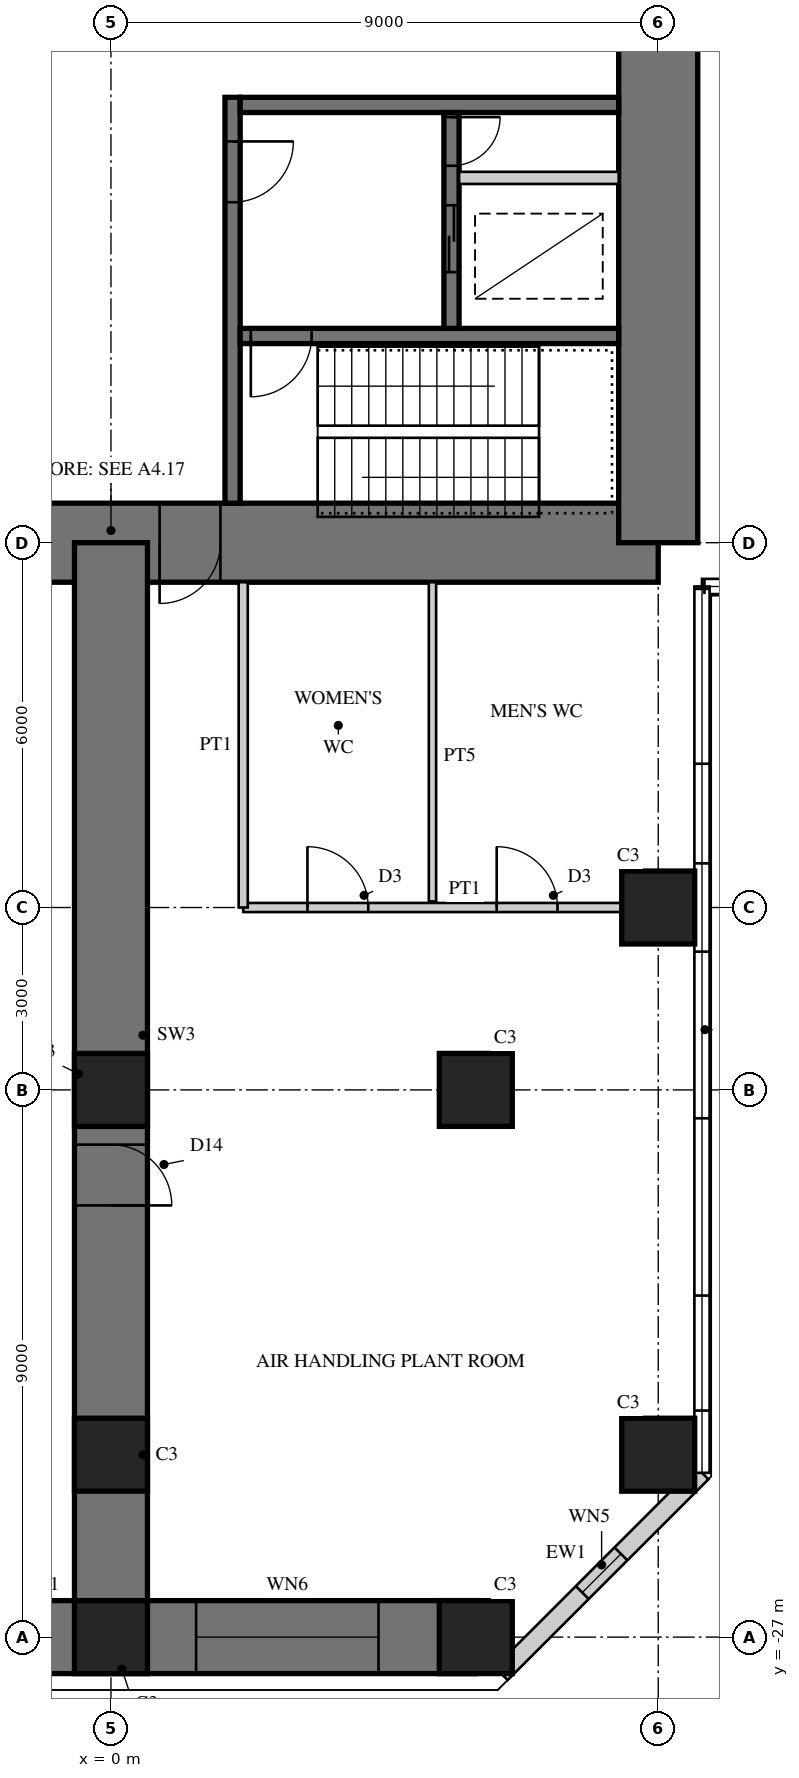
"""IFC4 building model, lengths in metres.
Left out: names, types, materials, properties, quantities, classifications, styles, units other than length and angle.
Written with IfcOpenShell. Run it as: python <this file> out.ifc"""

import sys

from ifc_helpers import new_model, si_unit, direction, frame, frame_2d, origin, origin_2d, place, context, subcontext, project, spatial, rectangle, hollow_rectangle, extrude, element, fill, save


model = new_model("IFC4")
c1 = context("Model", 3, precision=1e-05, world=origin(), true_north=direction((0.0, 1.0)))
c2 = subcontext(c1, "Body", "Model", "MODEL_VIEW")
j1 = project(units=[si_unit("LENGTHUNIT", "METRE"), si_unit("PLANEANGLEUNIT", "RADIAN")], contexts=[c1])
p1 = place(None, origin())
s1 = spatial("IfcSite", under=j1, at=p1, CompositionType="ELEMENT")
p2 = place(p1, origin())
s2 = spatial("IfcBuilding", under=s1, at=p2, CompositionType="ELEMENT")
p3 = place(p2, frame((0.0, 0.0, 95.5)))
s3 = spatial("IfcBuildingStorey", under=s2, at=p3, CompositionType="ELEMENT", Elevation=95.5)
p4 = place(p3, frame((-9.0, -9.0, 0.0), z_axis=(0.0, 0.0, 1.0), x_axis=(1.0, 0.0, 0.0)))
e1 = element("IfcWall", 1, at=p4, inside=s3, PredefinedType="SHEAR", context=c2, shape_type="SweptSolid", body=[
    extrude(rectangle(XDim=18.0, YDim=1.3, at=frame_2d((9.0, 0.0))), origin(), (0.0, 0.0, 1.0), 5.0),
])
p5 = place(p4, frame((9.8, 0.0, 0.0)))
e2 = element("IfcOpeningElement", 2, at=p5, cuts=e1, PredefinedType="OPENING", context=c2, shape_type="SweptSolid", body=[
    extrude(rectangle(XDim=1.0, YDim=2.4, at=frame_2d((0.5, 1.2))), frame((0.0, 0.66, 0.0), z_axis=(0.0, -1.0, 0.0), x_axis=(1.0, 0.0, 0.0)), (0.0, 0.0, 1.0), 1.32),
])
p6 = place(p3, frame((9.0, -9.0, 0.0), z_axis=(0.0, 0.0, 1.0), x_axis=(0.0, 1.0, 0.0)))
e3 = element("IfcWall", 3, at=p6, inside=s3, PredefinedType="SHEAR", context=c2, shape_type="SweptSolid", body=[
    extrude(rectangle(XDim=18.0, YDim=1.3, at=frame_2d((9.0, 0.0))), origin(), (0.0, 0.0, 1.0), 5.0),
])
p7 = place(p6, frame((9.8, 0.0, 0.0)))
e4 = element("IfcOpeningElement", 4, at=p7, cuts=e3, PredefinedType="OPENING", context=c2, shape_type="SweptSolid", body=[
    extrude(rectangle(XDim=1.0, YDim=2.4, at=frame_2d((0.5, 1.2))), frame((0.0, 0.66, 0.0), z_axis=(0.0, -1.0, 0.0), x_axis=(1.0, 0.0, 0.0)), (0.0, 0.0, 1.0), 1.32),
])
p8 = place(p3, frame((2.0, -1.675, 0.0), z_axis=(0.0, 0.0, 1.0), x_axis=(0.0, -1.0, 0.0)))
e5 = element("IfcWall", 5, at=p8, inside=s3, PredefinedType="SHEAR", context=c2, shape_type="SweptSolid", body=[
    extrude(rectangle(XDim=6.675, YDim=0.25, at=frame_2d((3.337, 0.0))), origin(), (0.0, 0.0, 1.0), 5.0),
])
p9 = place(p8, frame((0.725, 0.0, 0.0)))
e6 = element("IfcOpeningElement", 6, at=p9, cuts=e5, PredefinedType="OPENING", context=c2, shape_type="SweptSolid", body=[
    extrude(rectangle(XDim=1.0, YDim=2.1, at=frame_2d((0.5, 1.05))), frame((0.0, 0.135, 0.0), z_axis=(0.0, -1.0, 0.0), x_axis=(1.0, 0.0, 0.0)), (0.0, 0.0, 1.0), 0.27),
])
p10 = place(p3, frame((2.125, -1.8, 0.0), z_axis=(0.0, 0.0, 1.0), x_axis=(1.0, 0.0, 0.0)))
e7 = element("IfcWall", 7, at=p10, inside=s3, PredefinedType="SHEAR", context=c2, shape_type="SweptSolid", body=[
    extrude(rectangle(XDim=6.225, YDim=0.25, at=frame_2d((3.113, 0.0))), origin(), (0.0, 0.0, 1.0), 5.0),
])
p11 = place(p3, frame((2.125, -5.6, 0.0), z_axis=(0.0, 0.0, 1.0), x_axis=(1.0, 0.0, 0.0)))
e8 = element("IfcWall", 8, at=p11, inside=s3, PredefinedType="SHEAR", context=c2, shape_type="SweptSolid", body=[
    extrude(rectangle(XDim=6.225, YDim=0.25, at=frame_2d((3.113, 0.0))), origin(), (0.0, 0.0, 1.0), 5.0),
])
p12 = place(p11, frame((0.175, 0.0, 0.0)))
e9 = element("IfcOpeningElement", 9, at=p12, cuts=e8, PredefinedType="OPENING", context=c2, shape_type="SweptSolid", body=[
    extrude(rectangle(XDim=1.0, YDim=2.1, at=frame_2d((0.5, 1.05))), frame((0.0, 0.135, 0.0), z_axis=(0.0, -1.0, 0.0), x_axis=(1.0, 0.0, 0.0)), (0.0, 0.0, 1.0), 0.27),
])
p13 = place(p3, frame((5.6, -1.925, 0.0), z_axis=(0.0, 0.0, 1.0), x_axis=(0.0, -1.0, 0.0)))
e10 = element("IfcWall", 10, at=p13, inside=s3, PredefinedType="SHEAR", context=c2, shape_type="SweptSolid", body=[
    extrude(rectangle(XDim=3.55, YDim=0.25, at=frame_2d((1.775, 0.0))), origin(), (0.0, 0.0, 1.0), 5.0),
])
p14 = place(p13, frame((1.525, 0.0, 0.0)))
e11 = element("IfcOpeningElement", 11, at=p14, cuts=e10, PredefinedType="OPENING", context=c2, shape_type="SweptSolid", body=[
    extrude(rectangle(XDim=1.1, YDim=2.2, at=frame_2d((0.55, 1.1))), frame((0.0, 0.135, 0.0), z_axis=(0.0, -1.0, 0.0), x_axis=(1.0, 0.0, 0.0)), (0.0, 0.0, 1.0), 0.27),
])
p15 = place(p13, frame((0.075, 0.0, 0.0)))
e12 = element("IfcOpeningElement", 12, at=p15, cuts=e10, PredefinedType="OPENING", context=c2, shape_type="SweptSolid", body=[
    extrude(rectangle(XDim=0.8, YDim=2.1, at=frame_2d((0.4, 1.05))), frame((0.0, 0.135, 0.0), z_axis=(0.0, -1.0, 0.0), x_axis=(1.0, 0.0, 0.0)), (0.0, 0.0, 1.0), 0.27),
])
p16 = place(p3, frame((5.725, -3.0, 0.0), z_axis=(0.0, 0.0, 1.0), x_axis=(1.0, 0.0, 0.0)))
e13 = element("IfcWall", 13, at=p16, inside=s3, PredefinedType="PARTITIONING", context=c2, shape_type="SweptSolid", body=[
    extrude(rectangle(XDim=2.625, YDim=0.2, at=frame_2d((1.312, 0.0))), origin(), (0.0, 0.0, 1.0), 5.0),
])
p17 = place(p3, frame((0.0, -9.0, 0.0), z_axis=(0.0, 0.0, 1.0), x_axis=(0.0, -1.0, 0.0)))
e14 = element("IfcWall", 14, at=p17, inside=s3, PredefinedType="SHEAR", context=c2, shape_type="SweptSolid", body=[
    extrude(rectangle(XDim=18.0, YDim=1.2, at=frame_2d((9.0, 0.0))), origin(), (0.0, 0.0, 1.0), 5.0),
])
p18 = place(p17, frame((9.9, 0.0, 0.0)))
e15 = element("IfcOpeningElement", 15, at=p18, cuts=e14, PredefinedType="OPENING", context=c2, shape_type="SweptSolid", body=[
    extrude(rectangle(XDim=1.0, YDim=2.2, at=frame_2d((0.5, 1.1))), frame((0.0, 0.61, 0.0), z_axis=(0.0, -1.0, 0.0), x_axis=(1.0, 0.0, 0.0)), (0.0, 0.0, 1.0), 1.22),
])
p19 = place(p3, frame((-6.0, -27.0, 0.0), z_axis=(0.0, 0.0, 1.0), x_axis=(1.0, 0.0, 0.0)))
e16 = element("IfcWall", 16, at=p19, inside=s3, PredefinedType="SHEAR", context=c2, shape_type="SweptSolid", body=[
    extrude(rectangle(XDim=12.0, YDim=1.2, at=frame_2d((6.0, 0.0))), origin(), (0.0, 0.0, 1.0), 5.0),
])
p20 = place(p19, frame((1.6, 0.0, 0.6)))
e17 = element("IfcOpeningElement", 17, at=p20, cuts=e16, PredefinedType="OPENING", context=c2, shape_type="SweptSolid", body=[
    extrude(rectangle(XDim=3.0, YDim=2.4, at=frame_2d((1.5, 1.2))), frame((0.0, 0.61, 0.0), z_axis=(0.0, -1.0, 0.0), x_axis=(1.0, 0.0, 0.0)), (0.0, 0.0, 1.0), 1.22),
])
p21 = place(p19, frame((7.4, 0.0, 0.6)))
e18 = element("IfcOpeningElement", 18, at=p21, cuts=e16, PredefinedType="OPENING", context=c2, shape_type="SweptSolid", body=[
    extrude(rectangle(XDim=3.0, YDim=2.4, at=frame_2d((1.5, 1.2))), frame((0.0, 0.61, 0.0), z_axis=(0.0, -1.0, 0.0), x_axis=(1.0, 0.0, 0.0)), (0.0, 0.0, 1.0), 1.22),
])
for number, where, z_axis, x_axis in (
    (19, (9.0, -15.0, 0.0), (0.0, 0.0, 1.0), (1.0, 0.0, 0.0)),
    (20, (9.0, -24.0, 0.0), (0.0, 0.0, 1.0), (1.0, 0.0, 0.0)),
    (21, (0.0, -27.0, 0.0), (0.0, 0.0, 1.0), (1.0, 0.0, 0.0)),
    (22, (6.0, -27.0, 0.0), (0.0, 0.0, 1.0), (1.0, 0.0, 0.0)),
    (23, (0.0, -18.0, 0.0), (0.0, 0.0, 1.0), (1.0, 0.0, 0.0)),
    (24, (6.0, -18.0, 0.0), (0.0, 0.0, 1.0), (1.0, 0.0, 0.0)),
    (25, (0.0, -24.0, 0.0), (0.0, 0.0, 1.0), (1.0, 0.0, 0.0)),
):
    element("IfcColumn", number, at=place(p3, frame(where, z_axis=z_axis, x_axis=x_axis)), inside=s3, PredefinedType="COLUMN", context=c2, shape_type="SweptSolid", body=[
        extrude(rectangle(XDim=1.2, YDim=1.2, at=origin_2d()), origin(), (0.0, 0.0, 1.0), 5.0),
    ])
p22 = place(p3, frame((6.418, -27.6, 0.0), z_axis=(0.0, 0.0, 1.0), x_axis=(0.707106781187, 0.707106781187, 0.0)))
e26 = element("IfcWall", 26, at=p22, inside=s3, PredefinedType="SOLIDWALL", context=c2, shape_type="SweptSolid", body=[
    extrude(rectangle(XDim=4.669, YDim=0.3, at=frame_2d((2.335, 0.0))), origin(), (0.0, 0.0, 1.0), 4.8),
])
p23 = place(p22, frame((1.885, 0.0, 0.3)))
e27 = element("IfcOpeningElement", 27, at=p23, cuts=e26, PredefinedType="OPENING", context=c2, shape_type="SweptSolid", body=[
    extrude(rectangle(XDim=0.9, YDim=2.4, at=frame_2d((0.45, 1.2))), frame((0.0, 0.16, 0.0), z_axis=(0.0, -1.0, 0.0), x_axis=(1.0, 0.0, 0.0)), (0.0, 0.0, 1.0), 0.32),
])
p24 = place(p3, frame((2.175, -15.0, 0.0), z_axis=(0.0, 0.0, 1.0), x_axis=(1.0, 0.0, 0.0)))
e28 = element("IfcWall", 28, at=p24, inside=s3, PredefinedType="PARTITIONING", context=c2, shape_type="SweptSolid", body=[
    extrude(rectangle(XDim=6.225, YDim=0.15, at=frame_2d((3.112, 0.0))), origin(), (0.0, 0.0, 1.0), 3.95),
])
p25 = place(p24, frame((1.056, 0.0, 0.0)))
e29 = element("IfcOpeningElement", 29, at=p25, cuts=e28, PredefinedType="OPENING", context=c2, shape_type="SweptSolid", body=[
    extrude(rectangle(XDim=1.0, YDim=2.1, at=frame_2d((0.5, 1.05))), frame((0.0, 0.085, 0.0), z_axis=(0.0, -1.0, 0.0), x_axis=(1.0, 0.0, 0.0)), (0.0, 0.0, 1.0), 0.17),
])
p26 = place(p24, frame((4.169, 0.0, 0.0)))
e30 = element("IfcOpeningElement", 30, at=p26, cuts=e28, PredefinedType="OPENING", context=c2, shape_type="SweptSolid", body=[
    extrude(rectangle(XDim=1.0, YDim=2.1, at=frame_2d((0.5, 1.05))), frame((0.0, 0.085, 0.0), z_axis=(0.0, -1.0, 0.0), x_axis=(1.0, 0.0, 0.0)), (0.0, 0.0, 1.0), 0.17),
])
p27 = place(p3, frame((2.175, -9.65, 0.0), z_axis=(0.0, 0.0, 1.0), x_axis=(0.0, -1.0, 0.0)))
e31 = element("IfcWall", 31, at=p27, inside=s3, PredefinedType="PARTITIONING", context=c2, shape_type="SweptSolid", body=[
    extrude(rectangle(XDim=5.35, YDim=0.15, at=frame_2d((2.675, 0.0))), origin(), (0.0, 0.0, 1.0), 4.8),
])
p28 = place(p3, frame((5.288, -9.65, 0.0), z_axis=(0.0, 0.0, 1.0), x_axis=(0.0, -1.0, 0.0)))
e32 = element("IfcWall", 32, at=p28, inside=s3, PredefinedType="PLUMBINGWALL", context=c2, shape_type="SweptSolid", body=[
    extrude(rectangle(XDim=5.25, YDim=0.12, at=frame_2d((2.625, 0.0))), origin(), (0.0, 0.0, 1.0), 4.8),
])
p29 = place(p21, origin())
e33 = element("IfcWindow", 33, at=p29, inside=s3, PartitioningType="SINGLE_PANEL", PredefinedType="WINDOW", context=c2, shape_type="SweptSolid", body=[
    extrude(hollow_rectangle(XDim=3.0, YDim=2.4, WallThickness=0.06, at=frame_2d((1.5, 1.2))), frame((0.0, 0.03, 0.0), z_axis=(0.0, -1.0, 0.0), x_axis=(1.0, 0.0, 0.0)), (0.0, 0.0, 1.0), 0.06),
    extrude(rectangle(XDim=2.879, YDim=2.279, at=frame_2d((1.5, 1.2))), frame((0.0, 0.03, 0.0), z_axis=(0.0, -1.0, 0.0), x_axis=(1.0, 0.0, 0.0)), (0.0, 0.0, 1.0), 0.06),
])
fill(e18, e33)
p30 = place(p23, origin())
e34 = element("IfcWindow", 34, at=p30, inside=s3, PartitioningType="SINGLE_PANEL", PredefinedType="WINDOW", context=c2, shape_type="SweptSolid", body=[
    extrude(hollow_rectangle(XDim=0.9, YDim=2.4, WallThickness=0.06, at=frame_2d((0.45, 1.2))), frame((0.0, 0.03, 0.0), z_axis=(0.0, -1.0, 0.0), x_axis=(1.0, 0.0, 0.0)), (0.0, 0.0, 1.0), 0.06),
    extrude(rectangle(XDim=0.779, YDim=2.279, at=frame_2d((0.45, 1.2))), frame((0.0, 0.03, 0.0), z_axis=(0.0, -1.0, 0.0), x_axis=(1.0, 0.0, 0.0)), (0.0, 0.0, 1.0), 0.06),
])
fill(e27, e34)
p31 = place(p25, origin())
e35 = element("IfcDoor", 35, at=p31, inside=s3, OperationType="SINGLE_SWING_LEFT", PredefinedType="DOOR", context=c2, shape_type="SweptSolid", body=[
    extrude(rectangle(XDim=1.0, YDim=2.1, at=frame_2d((0.5, 1.05))), frame((0.0, 0.025, 0.0), z_axis=(0.0, -1.0, 0.0), x_axis=(1.0, 0.0, 0.0)), (0.0, 0.0, 1.0), 0.05),
])
fill(e29, e35)
p32 = place(p26, origin())
e36 = element("IfcDoor", 36, at=p32, inside=s3, OperationType="SINGLE_SWING_LEFT", PredefinedType="DOOR", context=c2, shape_type="SweptSolid", body=[
    extrude(rectangle(XDim=1.0, YDim=2.1, at=frame_2d((0.5, 1.05))), frame((0.0, 0.025, 0.0), z_axis=(0.0, -1.0, 0.0), x_axis=(1.0, 0.0, 0.0)), (0.0, 0.0, 1.0), 0.05),
])
fill(e30, e36)
p33 = place(p18, origin())
e37 = element("IfcDoor", 37, at=p33, inside=s3, OperationType="SINGLE_SWING_RIGHT", PredefinedType="DOOR", context=c2, shape_type="SweptSolid", body=[
    extrude(rectangle(XDim=1.0, YDim=2.2, at=frame_2d((0.5, 1.1))), frame((0.0, 0.025, 0.0), z_axis=(0.0, -1.0, 0.0), x_axis=(1.0, 0.0, 0.0)), (0.0, 0.0, 1.0), 0.05),
])
fill(e15, e37)
p34 = place(p5, frame((1.0, 0.0, 0.0), z_axis=(0.0, 0.0, 1.0), x_axis=(-1.0, 0.0, 0.0)))
e38 = element("IfcDoor", 38, at=p34, inside=s3, OperationType="SINGLE_SWING_RIGHT", PredefinedType="DOOR", context=c2, shape_type="SweptSolid", body=[
    extrude(rectangle(XDim=1.0, YDim=2.4, at=frame_2d((0.5, 1.2))), frame((0.0, -0.005, 0.0), z_axis=(0.0, -1.0, 0.0), x_axis=(1.0, 0.0, 0.0)), (0.0, 0.0, 1.0), 0.05),
])
fill(e2, e38)
p35 = place(p9, origin())
e39 = element("IfcDoor", 39, at=p35, inside=s3, OperationType="SINGLE_SWING_LEFT", PredefinedType="DOOR", context=c2, shape_type="SweptSolid", body=[
    extrude(rectangle(XDim=1.0, YDim=2.1, at=frame_2d((0.5, 1.05))), frame((0.0, 0.025, 0.0), z_axis=(0.0, -1.0, 0.0), x_axis=(1.0, 0.0, 0.0)), (0.0, 0.0, 1.0), 0.05),
])
fill(e6, e39)
p36 = place(p12, frame((1.0, 0.0, 0.0), z_axis=(0.0, 0.0, 1.0), x_axis=(-1.0, 0.0, 0.0)))
e40 = element("IfcDoor", 40, at=p36, inside=s3, OperationType="SINGLE_SWING_RIGHT", PredefinedType="DOOR", context=c2, shape_type="SweptSolid", body=[
    extrude(rectangle(XDim=1.0, YDim=2.1, at=frame_2d((0.5, 1.05))), frame((0.0, 0.025, 0.0), z_axis=(0.0, -1.0, 0.0), x_axis=(1.0, 0.0, 0.0)), (0.0, 0.0, 1.0), 0.05),
])
fill(e9, e40)
p37 = place(p14, origin())
e41 = element("IfcDoor", 41, at=p37, inside=s3, OperationType="DOUBLE_DOOR_SLIDING", PredefinedType="DOOR", context=c2, shape_type="SweptSolid", body=[
    extrude(rectangle(XDim=1.1, YDim=2.2, at=frame_2d((0.55, 1.1))), frame((0.0, 0.025, 0.0), z_axis=(0.0, -1.0, 0.0), x_axis=(1.0, 0.0, 0.0)), (0.0, 0.0, 1.0), 0.05),
])
fill(e11, e41)
p38 = place(p15, origin())
e42 = element("IfcDoor", 42, at=p38, inside=s3, OperationType="SINGLE_SWING_LEFT", PredefinedType="DOOR", context=c2, shape_type="SweptSolid", body=[
    extrude(rectangle(XDim=0.8, YDim=2.1, at=frame_2d((0.4, 1.05))), frame((0.0, 0.025, 0.0), z_axis=(0.0, -1.0, 0.0), x_axis=(1.0, 0.0, 0.0)), (0.0, 0.0, 1.0), 0.05),
])
fill(e12, e42)
save(model, sys.argv[1])
